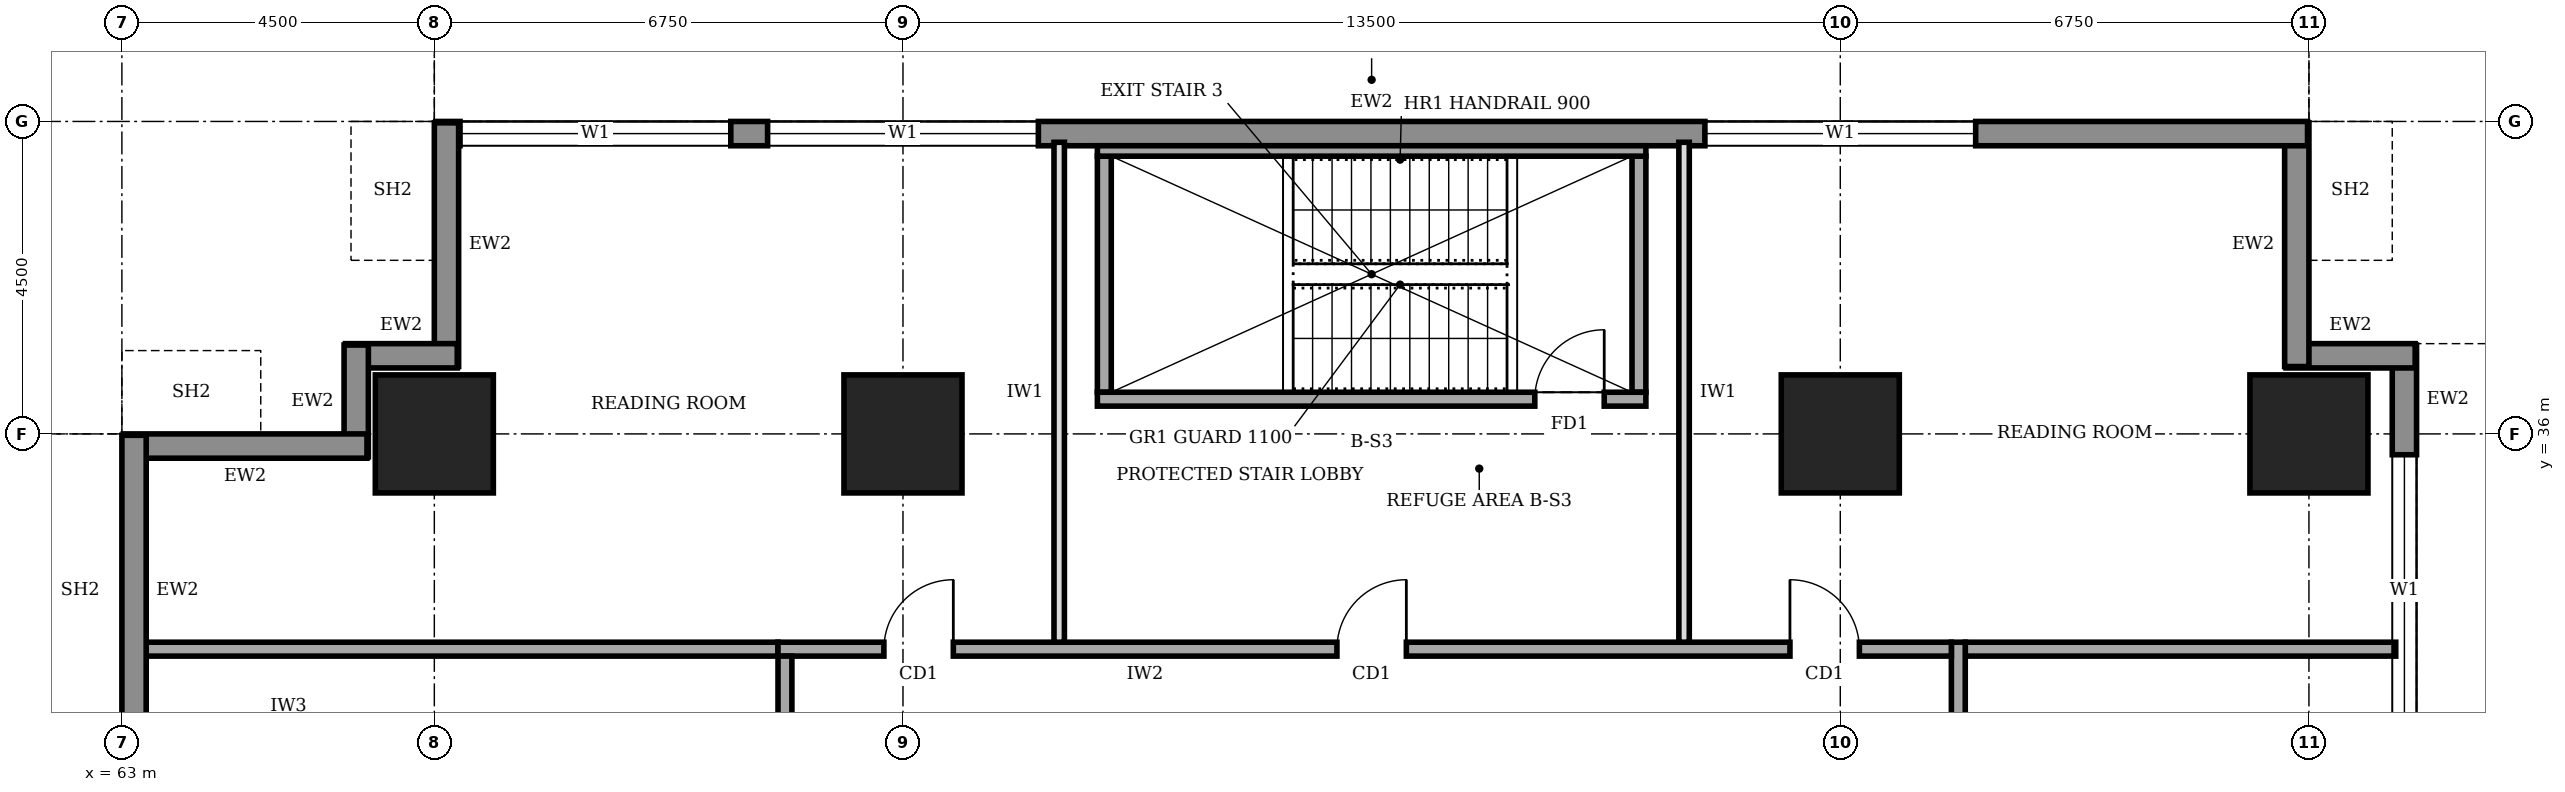
"""IFC4 building model, lengths in metres.
Left out: names, types, materials, properties, quantities, classifications, styles, units other than length and angle.
Written with IfcOpenShell. Run it as: python <this file> out.ifc"""

import sys

from ifc_helpers import new_model, si_unit, direction, frame, frame_2d, origin, origin_2d, place, context, subcontext, project, spatial, rectangle, extrude, element, fill, save


model = new_model("IFC4")
c1 = context("Model", 3, precision=1e-05, world=origin(), true_north=direction((0.0, 1.0)))
c2 = subcontext(c1, "Body", "Model", "MODEL_VIEW")
j1 = project(units=[si_unit("LENGTHUNIT", "METRE"), si_unit("PLANEANGLEUNIT", "RADIAN")], contexts=[c1])
p1 = place(None, origin())
s1 = spatial("IfcSite", under=j1, at=p1, CompositionType="ELEMENT")
p2 = place(p1, origin())
s2 = spatial("IfcBuilding", under=s1, at=p2, CompositionType="ELEMENT")
p3 = place(p2, frame((0.0, 0.0, 105.0)))
s3 = spatial("IfcBuildingStorey", under=s2, at=p3, CompositionType="ELEMENT", Elevation=105.0)
for number, where, z_axis, x_axis in (
    (1, (67.5, 36.0, 0.0), (0.0, 0.0, 1.0), (1.0, 0.0, 0.0)),
    (2, (74.25, 36.0, 0.0), (0.0, 0.0, 1.0), (1.0, 0.0, 0.0)),
    (3, (87.75, 36.0, 0.0), (0.0, 0.0, 1.0), (1.0, 0.0, 0.0)),
    (4, (94.5, 36.0, 0.0), (0.0, 0.0, 1.0), (1.0, 0.0, 0.0)),
):
    element("IfcColumn", number, at=place(p3, frame(where, z_axis=z_axis, x_axis=x_axis)), inside=s3, PredefinedType="COLUMN", context=c2, shape_type="SweptSolid", body=[
        extrude(rectangle(XDim=1.7, YDim=1.7, at=origin_2d()), origin(), (0.0, 0.0, 1.0), 4.0),
    ])
p4 = place(p3, frame((95.875, 3.32, 0.0), z_axis=(0.0, 0.0, 1.0), x_axis=(0.0, 1.0, 0.0)))
e5 = element("IfcWall", 5, at=p4, inside=s3, PredefinedType="STANDARD", context=c2, shape_type="SweptSolid", body=[
    extrude(rectangle(XDim=33.96, YDim=0.35, at=frame_2d((16.98, 0.0))), origin(), (0.0, 0.0, 1.0), 3.75),
])
p5 = place(p4, frame((1.48, 0.0, 0.9)))
e6 = element("IfcOpeningElement", 6, at=p5, cuts=e5, PredefinedType="OPENING", context=c2, shape_type="SweptSolid", body=[
    extrude(rectangle(XDim=3.9, YDim=2.2, at=frame_2d((1.95, 1.1))), frame((0.0, 0.185, 0.0), z_axis=(0.0, -1.0, 0.0), x_axis=(1.0, 0.0, 0.0)), (0.0, 0.0, 1.0), 0.37),
])
p6 = place(p4, frame((5.98, 0.0, 0.9)))
e7 = element("IfcOpeningElement", 7, at=p6, cuts=e5, PredefinedType="OPENING", context=c2, shape_type="SweptSolid", body=[
    extrude(rectangle(XDim=3.9, YDim=2.2, at=frame_2d((1.95, 1.1))), frame((0.0, 0.185, 0.0), z_axis=(0.0, -1.0, 0.0), x_axis=(1.0, 0.0, 0.0)), (0.0, 0.0, 1.0), 0.37),
])
p7 = place(p4, frame((10.48, 0.0, 0.9)))
e8 = element("IfcOpeningElement", 8, at=p7, cuts=e5, PredefinedType="OPENING", context=c2, shape_type="SweptSolid", body=[
    extrude(rectangle(XDim=3.9, YDim=2.2, at=frame_2d((1.95, 1.1))), frame((0.0, 0.185, 0.0), z_axis=(0.0, -1.0, 0.0), x_axis=(1.0, 0.0, 0.0)), (0.0, 0.0, 1.0), 0.37),
])
p8 = place(p4, frame((14.98, 0.0, 0.9)))
e9 = element("IfcOpeningElement", 9, at=p8, cuts=e5, PredefinedType="OPENING", context=c2, shape_type="SweptSolid", body=[
    extrude(rectangle(XDim=3.9, YDim=2.2, at=frame_2d((1.95, 1.1))), frame((0.0, 0.185, 0.0), z_axis=(0.0, -1.0, 0.0), x_axis=(1.0, 0.0, 0.0)), (0.0, 0.0, 1.0), 0.37),
])
p9 = place(p4, frame((19.48, 0.0, 0.9)))
e10 = element("IfcOpeningElement", 10, at=p9, cuts=e5, PredefinedType="OPENING", context=c2, shape_type="SweptSolid", body=[
    extrude(rectangle(XDim=3.9, YDim=2.2, at=frame_2d((1.95, 1.1))), frame((0.0, 0.185, 0.0), z_axis=(0.0, -1.0, 0.0), x_axis=(1.0, 0.0, 0.0)), (0.0, 0.0, 1.0), 0.37),
])
p10 = place(p4, frame((23.98, 0.0, 0.9)))
e11 = element("IfcOpeningElement", 11, at=p10, cuts=e5, PredefinedType="OPENING", context=c2, shape_type="SweptSolid", body=[
    extrude(rectangle(XDim=3.9, YDim=2.2, at=frame_2d((1.95, 1.1))), frame((0.0, 0.185, 0.0), z_axis=(0.0, -1.0, 0.0), x_axis=(1.0, 0.0, 0.0)), (0.0, 0.0, 1.0), 0.37),
])
p11 = place(p4, frame((28.48, 0.0, 0.9)))
e12 = element("IfcOpeningElement", 12, at=p11, cuts=e5, PredefinedType="OPENING", context=c2, shape_type="SweptSolid", body=[
    extrude(rectangle(XDim=3.9, YDim=2.2, at=frame_2d((1.95, 1.1))), frame((0.0, 0.185, 0.0), z_axis=(0.0, -1.0, 0.0), x_axis=(1.0, 0.0, 0.0)), (0.0, 0.0, 1.0), 0.37),
])
p12 = place(p3, frame((96.03, 37.125, 0.0), z_axis=(0.0, 0.0, 1.0), x_axis=(-1.0, 0.0, 0.0)))
e13 = element("IfcWall", 13, at=p12, inside=s3, PredefinedType="STANDARD", context=c2, shape_type="SweptSolid", body=[
    extrude(rectangle(XDim=1.86, YDim=0.35, at=frame_2d((0.93, 0.0))), origin(), (0.0, 0.0, 1.0), 3.75),
])
p13 = place(p3, frame((94.325, 36.97, 0.0), z_axis=(0.0, 0.0, 1.0), x_axis=(0.0, 1.0, 0.0)))
e14 = element("IfcWall", 14, at=p13, inside=s3, PredefinedType="STANDARD", context=c2, shape_type="SweptSolid", body=[
    extrude(rectangle(XDim=3.51, YDim=0.35, at=frame_2d((1.755, 0.0))), origin(), (0.0, 0.0, 1.0), 2.85),
])
p14 = place(p3, frame((94.48, 40.325, 0.0), z_axis=(0.0, 0.0, 1.0), x_axis=(-1.0, 0.0, 0.0)))
e15 = element("IfcWall", 15, at=p14, inside=s3, PredefinedType="STANDARD", context=c2, shape_type="SweptSolid", body=[
    extrude(rectangle(XDim=26.96, YDim=0.35, at=frame_2d((13.48, 0.0))), origin(), (0.0, 0.0, 1.0), 3.75),
])
p15 = place(p14, frame((22.71, 0.0, 0.9)))
e16 = element("IfcOpeningElement", 16, at=p15, cuts=e15, PredefinedType="OPENING", context=c2, shape_type="SweptSolid", body=[
    extrude(rectangle(XDim=3.9, YDim=2.2, at=frame_2d((1.95, 1.1))), frame((0.0, 0.185, 0.0), z_axis=(0.0, -1.0, 0.0), x_axis=(1.0, 0.0, 0.0)), (0.0, 0.0, 1.0), 0.37),
])
p16 = place(p14, frame((18.28, 0.0, 0.9)))
e17 = element("IfcOpeningElement", 17, at=p16, cuts=e15, PredefinedType="OPENING", context=c2, shape_type="SweptSolid", body=[
    extrude(rectangle(XDim=3.9, YDim=2.2, at=frame_2d((1.95, 1.1))), frame((0.0, 0.185, 0.0), z_axis=(0.0, -1.0, 0.0), x_axis=(1.0, 0.0, 0.0)), (0.0, 0.0, 1.0), 0.37),
])
p17 = place(p14, frame((4.78, 0.0, 0.9)))
e18 = element("IfcOpeningElement", 18, at=p17, cuts=e15, PredefinedType="OPENING", context=c2, shape_type="SweptSolid", body=[
    extrude(rectangle(XDim=3.9, YDim=2.2, at=frame_2d((1.95, 1.1))), frame((0.0, 0.185, 0.0), z_axis=(0.0, -1.0, 0.0), x_axis=(1.0, 0.0, 0.0)), (0.0, 0.0, 1.0), 0.37),
])
p18 = place(p3, frame((67.675, 40.48, 0.0), z_axis=(0.0, 0.0, 1.0), x_axis=(0.0, -1.0, 0.0)))
e19 = element("IfcWall", 19, at=p18, inside=s3, PredefinedType="STANDARD", context=c2, shape_type="SweptSolid", body=[
    extrude(rectangle(XDim=3.51, YDim=0.35, at=frame_2d((1.755, 0.0))), origin(), (0.0, 0.0, 1.0), 2.85),
])
for number, where, z_axis, x_axis in (
    (20, (67.83, 37.125, 0.0), (0.0, 0.0, 1.0), (-1.0, 0.0, 0.0)),
    (21, (66.375, 37.28, 0.0), (0.0, 0.0, 1.0), (0.0, -1.0, 0.0)),
):
    element("IfcWall", number, at=place(p3, frame(where, z_axis=z_axis, x_axis=x_axis)), inside=s3, PredefinedType="STANDARD", context=c2, shape_type="SweptSolid", body=[
        extrude(rectangle(XDim=1.61, YDim=0.35, at=frame_2d((0.805, 0.0))), origin(), (0.0, 0.0, 1.0), 3.75),
    ])
p19 = place(p3, frame((66.53, 35.825, 0.0), z_axis=(0.0, 0.0, 1.0), x_axis=(-1.0, 0.0, 0.0)))
e22 = element("IfcWall", 22, at=p19, inside=s3, PredefinedType="STANDARD", context=c2, shape_type="SweptSolid", body=[
    extrude(rectangle(XDim=3.51, YDim=0.35, at=frame_2d((1.755, 0.0))), origin(), (0.0, 0.0, 1.0), 2.85),
])
p20 = place(p3, frame((63.175, 35.98, 0.0), z_axis=(0.0, 0.0, 1.0), x_axis=(0.0, -1.0, 0.0)))
e23 = element("IfcWall", 23, at=p20, inside=s3, PredefinedType="STANDARD", context=c2, shape_type="SweptSolid", body=[
    extrude(rectangle(XDim=4.46, YDim=0.35, at=frame_2d((2.23, 0.0))), origin(), (0.0, 0.0, 1.0), 3.75),
])
p21 = place(p3, frame((89.45, 9.2, 0.0), z_axis=(0.0, 0.0, 1.0), x_axis=(0.0, 1.0, 0.0)))
e24 = element("IfcWall", 24, at=p21, inside=s3, PredefinedType="SOLIDWALL", context=c2, shape_type="SweptSolid", body=[
    extrude(rectangle(XDim=23.8, YDim=0.2, at=frame_2d((11.9, 0.0))), origin(), (0.0, 0.0, 1.0), 3.75),
])
p22 = place(p21, frame((1.625, 0.0, 0.0)))
e25 = element("IfcOpeningElement", 25, at=p22, cuts=e24, PredefinedType="OPENING", context=c2, shape_type="SweptSolid", body=[
    extrude(rectangle(XDim=1.0, YDim=2.1, at=frame_2d((0.5, 1.05))), frame((0.0, 0.11, 0.0), z_axis=(0.0, -1.0, 0.0), x_axis=(1.0, 0.0, 0.0)), (0.0, 0.0, 1.0), 0.22),
])
p23 = place(p21, frame((5.2, 0.0, 0.0)))
e26 = element("IfcOpeningElement", 26, at=p23, cuts=e24, PredefinedType="OPENING", context=c2, shape_type="SweptSolid", body=[
    extrude(rectangle(XDim=0.9, YDim=2.1, at=frame_2d((0.45, 1.05))), frame((0.0, 0.11, 0.0), z_axis=(0.0, -1.0, 0.0), x_axis=(1.0, 0.0, 0.0)), (0.0, 0.0, 1.0), 0.22),
])
p24 = place(p21, frame((8.325, 0.0, 0.0)))
e27 = element("IfcOpeningElement", 27, at=p24, cuts=e24, PredefinedType="OPENING", context=c2, shape_type="SweptSolid", body=[
    extrude(rectangle(XDim=0.9, YDim=2.1, at=frame_2d((0.45, 1.05))), frame((0.0, 0.11, 0.0), z_axis=(0.0, -1.0, 0.0), x_axis=(1.0, 0.0, 0.0)), (0.0, 0.0, 1.0), 0.22),
])
p25 = place(p21, frame((13.725, 0.0, 0.0)))
e28 = element("IfcOpeningElement", 28, at=p25, cuts=e24, PredefinedType="OPENING", context=c2, shape_type="SweptSolid", body=[
    extrude(rectangle(XDim=0.9, YDim=2.1, at=frame_2d((0.45, 1.05))), frame((0.0, 0.11, 0.0), z_axis=(0.0, -1.0, 0.0), x_axis=(1.0, 0.0, 0.0)), (0.0, 0.0, 1.0), 0.22),
])
p26 = place(p21, frame((16.15, 0.0, 0.0)))
e29 = element("IfcOpeningElement", 29, at=p26, cuts=e24, PredefinedType="OPENING", context=c2, shape_type="SweptSolid", body=[
    extrude(rectangle(XDim=1.0, YDim=2.1, at=frame_2d((0.5, 1.05))), frame((0.0, 0.11, 0.0), z_axis=(0.0, -1.0, 0.0), x_axis=(1.0, 0.0, 0.0)), (0.0, 0.0, 1.0), 0.22),
])
p27 = place(p21, frame((11.2, 0.0, 0.0)))
e30 = element("IfcOpeningElement", 30, at=p27, cuts=e24, PredefinedType="OPENING", context=c2, shape_type="SweptSolid", body=[
    extrude(rectangle(XDim=1.0, YDim=2.1, at=frame_2d((0.5, 1.05))), frame((0.0, 0.11, 0.0), z_axis=(0.0, -1.0, 0.0), x_axis=(1.0, 0.0, 0.0)), (0.0, 0.0, 1.0), 0.22),
])
p28 = place(p21, frame((20.225, 0.0, 0.0)))
e31 = element("IfcOpeningElement", 31, at=p28, cuts=e24, PredefinedType="OPENING", context=c2, shape_type="SweptSolid", body=[
    extrude(rectangle(XDim=1.0, YDim=2.1, at=frame_2d((0.5, 1.05))), frame((0.0, 0.11, 0.0), z_axis=(0.0, -1.0, 0.0), x_axis=(1.0, 0.0, 0.0)), (0.0, 0.0, 1.0), 0.22),
])
p29 = place(p3, frame((89.35, 32.9, 0.0), z_axis=(0.0, 0.0, 1.0), x_axis=(-1.0, 0.0, 0.0)))
e32 = element("IfcWall", 32, at=p29, inside=s3, PredefinedType="SOLIDWALL", context=c2, shape_type="SweptSolid", body=[
    extrude(rectangle(XDim=16.9, YDim=0.2, at=frame_2d((8.45, 0.0))), origin(), (0.0, 0.0, 1.0), 3.75),
])
p30 = place(p29, frame((14.375, 0.0, 0.0)))
e33 = element("IfcOpeningElement", 33, at=p30, cuts=e32, PredefinedType="OPENING", context=c2, shape_type="SweptSolid", body=[
    extrude(rectangle(XDim=1.0, YDim=2.1, at=frame_2d((0.5, 1.05))), frame((0.0, 0.11, 0.0), z_axis=(0.0, -1.0, 0.0), x_axis=(1.0, 0.0, 0.0)), (0.0, 0.0, 1.0), 0.22),
])
p31 = place(p29, frame((7.85, 0.0, 0.0)))
e34 = element("IfcOpeningElement", 34, at=p31, cuts=e32, PredefinedType="OPENING", context=c2, shape_type="SweptSolid", body=[
    extrude(rectangle(XDim=1.0, YDim=2.1, at=frame_2d((0.5, 1.05))), frame((0.0, 0.11, 0.0), z_axis=(0.0, -1.0, 0.0), x_axis=(1.0, 0.0, 0.0)), (0.0, 0.0, 1.0), 0.22),
])
p32 = place(p29, frame((1.325, 0.0, 0.0)))
e35 = element("IfcOpeningElement", 35, at=p32, cuts=e32, PredefinedType="OPENING", context=c2, shape_type="SweptSolid", body=[
    extrude(rectangle(XDim=1.0, YDim=2.1, at=frame_2d((0.5, 1.05))), frame((0.0, 0.11, 0.0), z_axis=(0.0, -1.0, 0.0), x_axis=(1.0, 0.0, 0.0)), (0.0, 0.0, 1.0), 0.22),
])
p33 = place(p3, frame((72.55, 32.8, 0.0), z_axis=(0.0, 0.0, 1.0), x_axis=(0.0, -1.0, 0.0)))
e36 = element("IfcWall", 36, at=p33, inside=s3, PredefinedType="SOLIDWALL", context=c2, shape_type="SweptSolid", body=[
    extrude(rectangle(XDim=23.8, YDim=0.2, at=frame_2d((11.9, 0.0))), origin(), (0.0, 0.0, 1.0), 3.75),
])
p34 = place(p33, frame((10.9, 0.0, 0.0)))
e37 = element("IfcOpeningElement", 37, at=p34, cuts=e36, PredefinedType="OPENING", context=c2, shape_type="SweptSolid", body=[
    extrude(rectangle(XDim=1.8, YDim=2.1, at=frame_2d((0.9, 1.05))), frame((0.0, 0.11, 0.0), z_axis=(0.0, -1.0, 0.0), x_axis=(1.0, 0.0, 0.0)), (0.0, 0.0, 1.0), 0.22),
])
p35 = place(p3, frame((63.3, 32.9, 0.0), z_axis=(0.0, 0.0, 1.0), x_axis=(1.0, 0.0, 0.0)))
e38 = element("IfcWall", 38, at=p35, inside=s3, PredefinedType="SOLIDWALL", context=c2, shape_type="SweptSolid", body=[
    extrude(rectangle(XDim=9.15, YDim=0.2, at=frame_2d((4.575, 0.0))), origin(), (0.0, 0.0, 1.0), 3.75),
])
p36 = place(p3, frame((89.55, 32.9, 0.0), z_axis=(0.0, 0.0, 1.0), x_axis=(1.0, 0.0, 0.0)))
e39 = element("IfcWall", 39, at=p36, inside=s3, PredefinedType="SOLIDWALL", context=c2, shape_type="SweptSolid", body=[
    extrude(rectangle(XDim=6.2, YDim=0.2, at=frame_2d((3.1, 0.0))), origin(), (0.0, 0.0, 1.0), 3.75),
])
for number, where, z_axis, x_axis in (
    (40, (76.5, 33.0, 0.0), (0.0, 0.0, 1.0), (0.0, 1.0, 0.0)),
    (41, (85.5, 33.0, 0.0), (0.0, 0.0, 1.0), (0.0, 1.0, 0.0)),
):
    element("IfcWall", number, at=place(p3, frame(where, z_axis=z_axis, x_axis=x_axis)), inside=s3, PredefinedType="PARTITIONING", context=c2, shape_type="SweptSolid", body=[
        extrude(rectangle(XDim=7.2, YDim=0.15, at=frame_2d((3.6, 0.0))), origin(), (0.0, 0.0, 1.0), 3.75),
    ])
p37 = place(p3, frame((77.05, 36.5, 0.0), z_axis=(0.0, 0.0, 1.0), x_axis=(1.0, 0.0, 0.0)))
e42 = element("IfcWall", 42, at=p37, inside=s3, PredefinedType="SOLIDWALL", context=c2, shape_type="SweptSolid", body=[
    extrude(rectangle(XDim=7.9, YDim=0.2, at=frame_2d((3.95, 0.0))), origin(), (0.0, 0.0, 1.0), 3.75),
])
p38 = place(p37, frame((6.3, 0.0, 0.0)))
e43 = element("IfcOpeningElement", 43, at=p38, cuts=e42, PredefinedType="OPENING", context=c2, shape_type="SweptSolid", body=[
    extrude(rectangle(XDim=1.0, YDim=2.1, at=frame_2d((0.5, 1.05))), frame((0.0, 0.11, 0.0), z_axis=(0.0, -1.0, 0.0), x_axis=(1.0, 0.0, 0.0)), (0.0, 0.0, 1.0), 0.22),
])
p39 = place(p3, frame((77.05, 40.075, 0.0), z_axis=(0.0, 0.0, 1.0), x_axis=(1.0, 0.0, 0.0)))
e44 = element("IfcWall", 44, at=p39, inside=s3, PredefinedType="SOLIDWALL", context=c2, shape_type="SweptSolid", body=[
    extrude(rectangle(XDim=7.9, YDim=0.15, at=frame_2d((3.95, 0.0))), origin(), (0.0, 0.0, 1.0), 3.75),
])
for number, where, z_axis, x_axis in (
    (45, (77.15, 36.6, 0.0), (0.0, 0.0, 1.0), (0.0, 1.0, 0.0)),
    (46, (84.85, 36.6, 0.0), (0.0, 0.0, 1.0), (0.0, 1.0, 0.0)),
):
    element("IfcWall", number, at=place(p3, frame(where, z_axis=z_axis, x_axis=x_axis)), inside=s3, PredefinedType="SOLIDWALL", context=c2, shape_type="SweptSolid", body=[
        extrude(rectangle(XDim=3.4, YDim=0.2, at=frame_2d((1.7, 0.0))), origin(), (0.0, 0.0, 1.0), 3.75),
    ])
p40 = place(p11, origin())
e47 = element("IfcWindow", 47, at=p40, inside=s3, PartitioningType="SINGLE_PANEL", PredefinedType="WINDOW", context=c2, shape_type="SweptSolid", body=[
    extrude(rectangle(XDim=3.9, YDim=2.2, at=frame_2d((1.95, 1.1))), frame((0.0, 0.03, 0.0), z_axis=(0.0, -1.0, 0.0), x_axis=(1.0, 0.0, 0.0)), (0.0, 0.0, 1.0), 0.06),
])
fill(e12, e47)
p41 = place(p15, origin())
e48 = element("IfcWindow", 48, at=p41, inside=s3, PartitioningType="SINGLE_PANEL", PredefinedType="WINDOW", context=c2, shape_type="SweptSolid", body=[
    extrude(rectangle(XDim=3.9, YDim=2.2, at=frame_2d((1.95, 1.1))), frame((0.0, 0.03, 0.0), z_axis=(0.0, -1.0, 0.0), x_axis=(1.0, 0.0, 0.0)), (0.0, 0.0, 1.0), 0.06),
])
fill(e16, e48)
p42 = place(p16, origin())
e49 = element("IfcWindow", 49, at=p42, inside=s3, PartitioningType="SINGLE_PANEL", PredefinedType="WINDOW", context=c2, shape_type="SweptSolid", body=[
    extrude(rectangle(XDim=3.9, YDim=2.2, at=frame_2d((1.95, 1.1))), frame((0.0, 0.03, 0.0), z_axis=(0.0, -1.0, 0.0), x_axis=(1.0, 0.0, 0.0)), (0.0, 0.0, 1.0), 0.06),
])
fill(e17, e49)
p43 = place(p17, origin())
e50 = element("IfcWindow", 50, at=p43, inside=s3, PartitioningType="SINGLE_PANEL", PredefinedType="WINDOW", context=c2, shape_type="SweptSolid", body=[
    extrude(rectangle(XDim=3.9, YDim=2.2, at=frame_2d((1.95, 1.1))), frame((0.0, 0.03, 0.0), z_axis=(0.0, -1.0, 0.0), x_axis=(1.0, 0.0, 0.0)), (0.0, 0.0, 1.0), 0.06),
])
fill(e18, e50)
p44 = place(p30, frame((1.0, 0.0, 0.0), z_axis=(0.0, 0.0, 1.0), x_axis=(-1.0, 0.0, 0.0)))
e51 = element("IfcDoor", 51, at=p44, inside=s3, OperationType="SINGLE_SWING_RIGHT", PredefinedType="DOOR", context=c2, shape_type="SweptSolid", body=[
    extrude(rectangle(XDim=1.0, YDim=2.1, at=frame_2d((0.5, 1.05))), frame((0.0, 0.025, 0.0), z_axis=(0.0, -1.0, 0.0), x_axis=(1.0, 0.0, 0.0)), (0.0, 0.0, 1.0), 0.05),
])
fill(e33, e51)
p45 = place(p31, frame((1.0, 0.0, 0.0), z_axis=(0.0, 0.0, 1.0), x_axis=(-1.0, 0.0, 0.0)))
e52 = element("IfcDoor", 52, at=p45, inside=s3, OperationType="SINGLE_SWING_RIGHT", PredefinedType="DOOR", context=c2, shape_type="SweptSolid", body=[
    extrude(rectangle(XDim=1.0, YDim=2.1, at=frame_2d((0.5, 1.05))), frame((0.0, 0.025, 0.0), z_axis=(0.0, -1.0, 0.0), x_axis=(1.0, 0.0, 0.0)), (0.0, 0.0, 1.0), 0.05),
])
fill(e34, e52)
p46 = place(p32, frame((1.0, 0.0, 0.0), z_axis=(0.0, 0.0, 1.0), x_axis=(-1.0, 0.0, 0.0)))
e53 = element("IfcDoor", 53, at=p46, inside=s3, OperationType="SINGLE_SWING_LEFT", PredefinedType="DOOR", context=c2, shape_type="SweptSolid", body=[
    extrude(rectangle(XDim=1.0, YDim=2.1, at=frame_2d((0.5, 1.05))), frame((0.0, 0.025, 0.0), z_axis=(0.0, -1.0, 0.0), x_axis=(1.0, 0.0, 0.0)), (0.0, 0.0, 1.0), 0.05),
])
fill(e35, e53)
p47 = place(p38, origin())
e54 = element("IfcDoor", 54, at=p47, inside=s3, OperationType="SINGLE_SWING_RIGHT", PredefinedType="DOOR", context=c2, shape_type="SweptSolid", body=[
    extrude(rectangle(XDim=1.0, YDim=2.1, at=frame_2d((0.5, 1.05))), frame((0.0, 0.025, 0.0), z_axis=(0.0, -1.0, 0.0), x_axis=(1.0, 0.0, 0.0)), (0.0, 0.0, 1.0), 0.05),
])
fill(e43, e54)
save(model, sys.argv[1])
